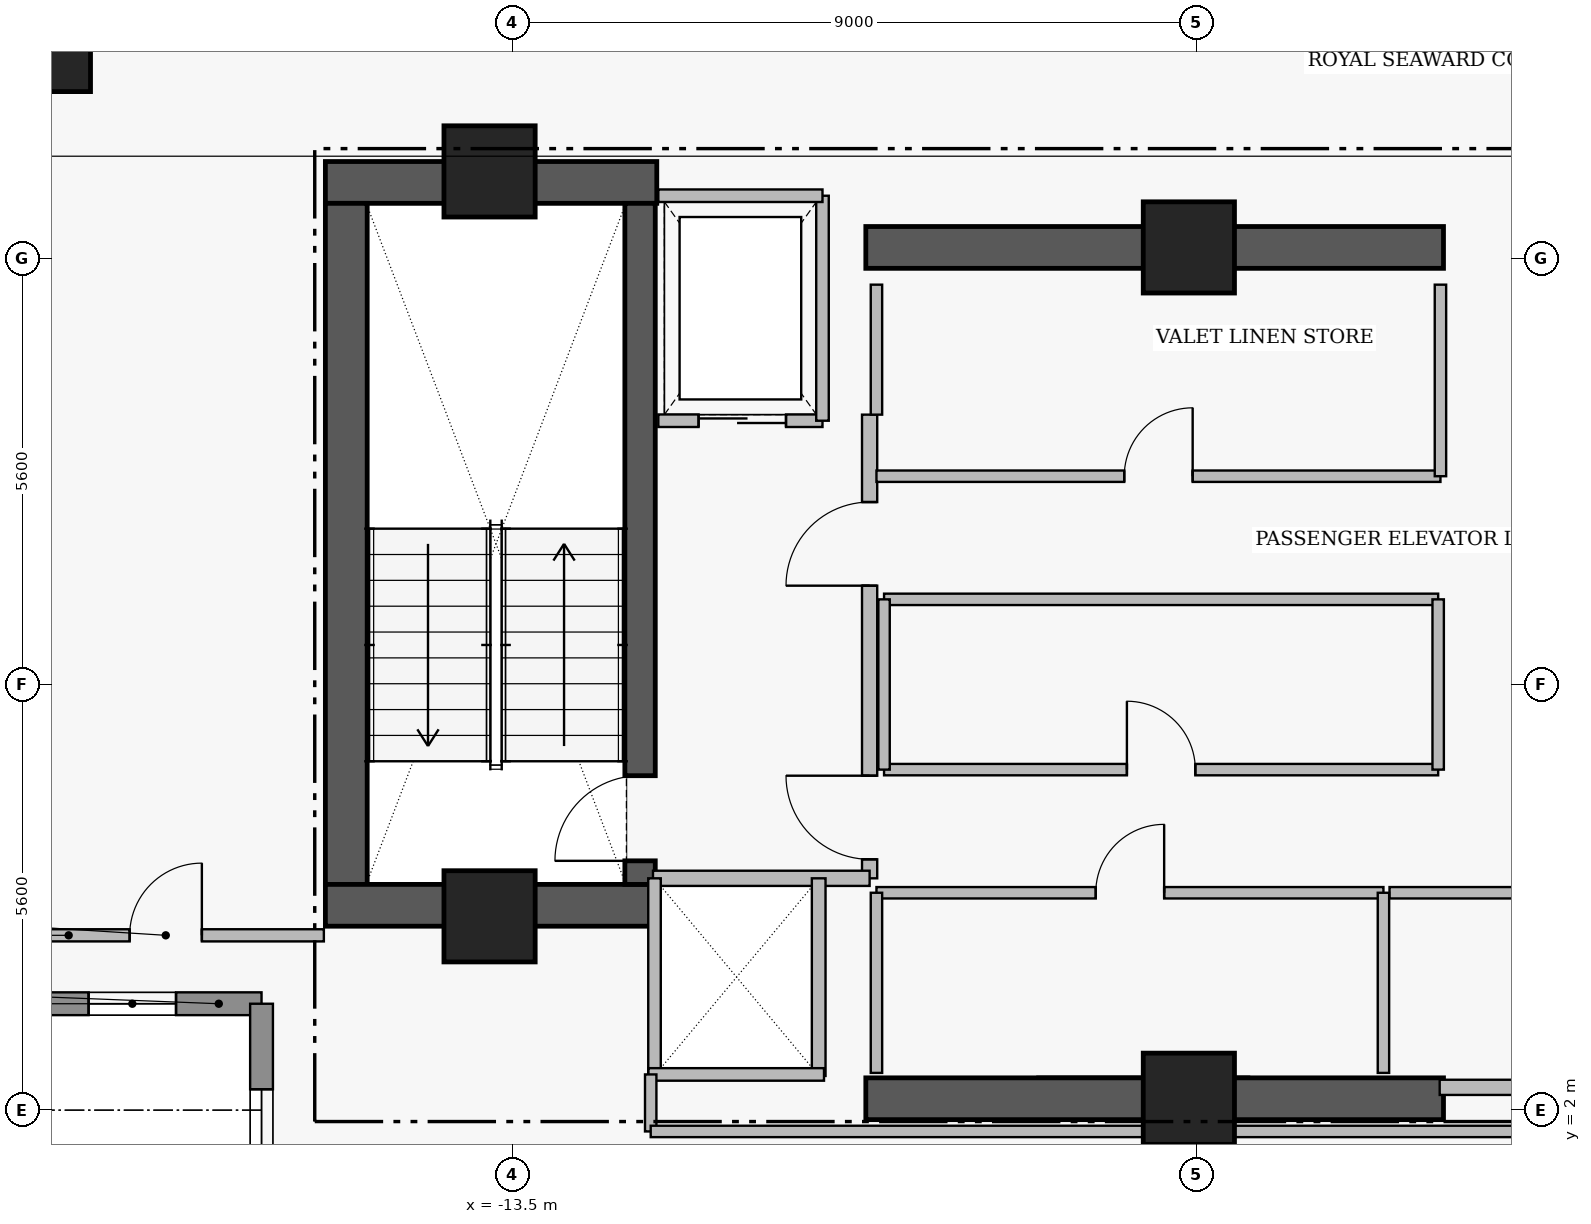
"""IFC4 building model, lengths in metres.
Left out: names, types, materials, properties, quantities, classifications, styles, units other than length and angle.
Written with IfcOpenShell. Run it as: python <this file> out.ifc"""

import sys

from ifc_helpers import new_model, si_unit, direction, frame, frame_2d, origin, origin_2d, place, context, subcontext, project, spatial, rectangle, extrude, element, fill, save


model = new_model("IFC4")
c1 = context("Model", 3, precision=1e-05, world=origin(), true_north=direction((0.0, 1.0)))
c2 = subcontext(c1, "Body", "Model", "MODEL_VIEW")
j1 = project(units=[si_unit("LENGTHUNIT", "METRE"), si_unit("PLANEANGLEUNIT", "RADIAN")], contexts=[c1])
p1 = place(None, origin())
s1 = spatial("IfcSite", under=j1, at=p1, CompositionType="ELEMENT")
p2 = place(p1, origin())
s2 = spatial("IfcBuilding", under=s1, at=p2, CompositionType="ELEMENT")
p3 = place(p2, frame((0.0, 0.0, 261.85)))
s3 = spatial("IfcBuildingStorey", under=s2, at=p3, CompositionType="ELEMENT", Elevation=261.85)
p4 = place(p3, frame((-15.96, 14.205, 0.0), z_axis=(0.0, 0.0, 1.0), x_axis=(1.0, 0.0, 0.0)))
e1 = element("IfcWall", 1, at=p4, inside=s3, PredefinedType="SHEAR", context=c2, shape_type="SweptSolid", body=[
    extrude(rectangle(XDim=4.36, YDim=0.55, at=frame_2d((2.18, 0.0))), origin(), (0.0, 0.0, 1.0), 3.51),
])
p5 = place(p3, frame((-15.685, 4.97, 0.0), z_axis=(0.0, 0.0, 1.0), x_axis=(0.0, 1.0, 0.0)))
e2 = element("IfcWall", 2, at=p5, inside=s3, PredefinedType="SHEAR", context=c2, shape_type="SweptSolid", body=[
    extrude(rectangle(XDim=8.96, YDim=0.55, at=frame_2d((4.48, 0.0))), origin(), (0.0, 0.0, 1.0), 3.51),
])
p6 = place(p3, frame((-15.96, 4.695, 0.0), z_axis=(0.0, 0.0, 1.0), x_axis=(1.0, 0.0, 0.0)))
e3 = element("IfcWall", 3, at=p6, inside=s3, PredefinedType="SHEAR", context=c2, shape_type="SweptSolid", body=[
    extrude(rectangle(XDim=4.36, YDim=0.55, at=frame_2d((2.18, 0.0))), origin(), (0.0, 0.0, 1.0), 3.51),
])
for number, where, z_axis, x_axis in (
    (4, (-8.85, 2.15, 0.0), (0.0, 0.0, 1.0), (1.0, 0.0, 0.0)),
    (5, (-8.85, 13.35, 0.0), (0.0, 0.0, 1.0), (1.0, 0.0, 0.0)),
):
    element("IfcWall", number, at=place(p3, frame(where, z_axis=z_axis, x_axis=x_axis)), inside=s3, PredefinedType="SHEAR", context=c2, shape_type="SweptSolid", body=[
        extrude(rectangle(XDim=7.6, YDim=0.55, at=frame_2d((3.8, 0.0))), origin(), (0.0, 0.0, 1.0), 3.48),
    ])
p7 = place(p3, frame((-11.82, 4.97, 0.0), z_axis=(0.0, 0.0, 1.0), x_axis=(0.0, 1.0, 0.0)))
e6 = element("IfcWall", 6, at=p7, inside=s3, PredefinedType="SHEAR", context=c2, shape_type="SweptSolid", body=[
    extrude(rectangle(XDim=8.96, YDim=0.4, at=frame_2d((4.48, 0.0))), origin(), (0.0, 0.0, 1.0), 3.51),
])
p8 = place(p7, frame((0.31, 0.0, 0.0)))
e7 = element("IfcOpeningElement", 7, at=p8, cuts=e6, PredefinedType="OPENING", context=c2, shape_type="SweptSolid", body=[
    extrude(rectangle(XDim=1.12, YDim=2.22, at=frame_2d((0.56, 1.11))), frame((0.0, 0.21, 0.0), z_axis=(0.0, -1.0, 0.0), x_axis=(1.0, 0.0, 0.0)), (0.0, 0.0, 1.0), 0.42),
])
for number, where, z_axis, x_axis in (
    (8, (-13.8, 14.35, 0.0), (0.0, 0.0, 1.0), (1.0, 0.0, 0.0)),
    (9, (-4.6, 13.35, 0.0), (0.0, 0.0, 1.0), (1.0, 0.0, 0.0)),
    (10, (-13.8, 4.55, 0.0), (0.0, 0.0, 1.0), (1.0, 0.0, 0.0)),
    (11, (-4.6, 2.15, 0.0), (0.0, 0.0, 1.0), (1.0, 0.0, 0.0)),
):
    element("IfcColumn", number, at=place(p3, frame(where, z_axis=z_axis, x_axis=x_axis)), inside=s3, PredefinedType="COLUMN", context=c2, shape_type="SweptSolid", body=[
        extrude(rectangle(XDim=1.2, YDim=1.2, at=origin_2d()), origin(), (0.0, 0.0, 1.0), 3.7),
    ])
p9 = place(p3, frame((-19.55, 15.9, 0.0), z_axis=(0.0, 0.0, 1.0), x_axis=(1.0, 0.0, 0.0)))
e12 = element("IfcColumn", 12, at=p9, inside=s3, PredefinedType="COLUMN", context=c2, shape_type="SweptSolid", body=[
    extrude(rectangle(XDim=1.0, YDim=1.0, at=origin_2d()), origin(), (0.0, 0.0, 1.0), 3.7),
])
p10 = place(p3, frame((-16.8, 3.4, 0.0), z_axis=(0.0, 0.0, 1.0), x_axis=(-1.0, 0.0, 0.0)))
e13 = element("IfcWall", 13, at=p10, inside=s3, PredefinedType="STANDARD", context=c2, shape_type="SweptSolid", body=[
    extrude(rectangle(XDim=3.4, YDim=0.3, at=frame_2d((1.7, 0.0))), origin(), (0.0, 0.0, 1.0), 3.48),
])
p11 = place(p10, frame((1.125, 0.0, 1.25)))
e14 = element("IfcOpeningElement", 14, at=p11, cuts=e13, PredefinedType="OPENING", context=c2, shape_type="SweptSolid", body=[
    extrude(rectangle(XDim=1.15, YDim=1.55, at=frame_2d((0.575, 0.775))), frame((0.0, 0.16, 0.0), z_axis=(0.0, -1.0, 0.0), x_axis=(1.0, 0.0, 0.0)), (0.0, 0.0, 1.0), 0.32),
])
p12 = place(p3, frame((-16.8, 0.0, 0.0), z_axis=(0.0, 0.0, 1.0), x_axis=(0.0, 1.0, 0.0)))
e15 = element("IfcWall", 15, at=p12, inside=s3, PredefinedType="STANDARD", context=c2, shape_type="SweptSolid", body=[
    extrude(rectangle(XDim=3.4, YDim=0.3, at=frame_2d((1.7, 0.0))), origin(), (0.0, 0.0, 1.0), 3.48),
])
p13 = place(p12, frame((1.125, 0.0, 1.25)))
e16 = element("IfcOpeningElement", 16, at=p13, cuts=e15, PredefinedType="OPENING", context=c2, shape_type="SweptSolid", body=[
    extrude(rectangle(XDim=1.15, YDim=1.55, at=frame_2d((0.575, 0.775))), frame((0.0, 0.16, 0.0), z_axis=(0.0, -1.0, 0.0), x_axis=(1.0, 0.0, 0.0)), (0.0, 0.0, 1.0), 0.32),
])
p14 = place(p3, frame((-8.8, 5.05, 0.0), z_axis=(0.0, 0.0, 1.0), x_axis=(0.0, 1.0, 0.0)))
e17 = element("IfcWall", 17, at=p14, inside=s3, PredefinedType="PARTITIONING", context=c2, shape_type="SweptSolid", body=[
    extrude(rectangle(XDim=6.1, YDim=0.2, at=frame_2d((3.05, 0.0))), origin(), (0.0, 0.0, 1.0), 3.48),
])
p15 = place(p14, frame((0.25, 0.0, 0.0)))
e18 = element("IfcOpeningElement", 18, at=p15, cuts=e17, PredefinedType="OPENING", context=c2, shape_type="SweptSolid", body=[
    extrude(rectangle(XDim=1.1, YDim=2.2, at=frame_2d((0.55, 1.1))), frame((0.0, 0.11, 0.0), z_axis=(0.0, -1.0, 0.0), x_axis=(1.0, 0.0, 0.0)), (0.0, 0.0, 1.0), 0.22),
])
p16 = place(p14, frame((3.85, 0.0, 0.0)))
e19 = element("IfcOpeningElement", 19, at=p16, cuts=e17, PredefinedType="OPENING", context=c2, shape_type="SweptSolid", body=[
    extrude(rectangle(XDim=1.1, YDim=2.2, at=frame_2d((0.55, 1.1))), frame((0.0, 0.11, 0.0), z_axis=(0.0, -1.0, 0.0), x_axis=(1.0, 0.0, 0.0)), (0.0, 0.0, 1.0), 0.22),
])
p17 = place(p3, frame((-11.58, 11.07, 0.0), z_axis=(0.0, 0.0, 1.0), x_axis=(1.0, 0.0, 0.0)))
e20 = element("IfcWall", 20, at=p17, inside=s3, PredefinedType="PARTITIONING", context=c2, shape_type="SweptSolid", body=[
    extrude(rectangle(XDim=2.16, YDim=0.165, at=frame_2d((1.08, 0.0))), origin(), (0.0, 0.0, 1.0), 3.48),
])
p18 = place(p17, frame((0.53, 0.0, 0.0)))
e21 = element("IfcOpeningElement", 21, at=p18, cuts=e20, PredefinedType="OPENING", context=c2, shape_type="SweptSolid", body=[
    extrude(rectangle(XDim=1.15, YDim=2.25, at=frame_2d((0.575, 1.125))), frame((0.0, 0.093, 0.0), z_axis=(0.0, -1.0, 0.0), x_axis=(1.0, 0.0, 0.0)), (0.0, 0.0, 1.0), 0.185),
])
p19 = place(p3, frame((-8.71, 4.86, 0.0), z_axis=(0.0, 0.0, 1.0), x_axis=(1.0, 0.0, 0.0)))
e22 = element("IfcWall", 22, at=p19, inside=s3, PredefinedType="PARTITIONING", context=c2, shape_type="SweptSolid", body=[
    extrude(rectangle(XDim=6.67, YDim=0.15, at=frame_2d((3.335, 0.0))), origin(), (0.0, 0.0, 1.0), 3.48),
])
p20 = place(p19, frame((2.885, 0.0, 0.0)))
e23 = element("IfcOpeningElement", 23, at=p20, cuts=e22, PredefinedType="OPENING", context=c2, shape_type="SweptSolid", body=[
    extrude(rectangle(XDim=0.9, YDim=2.15, at=frame_2d((0.45, 1.075))), frame((0.0, 0.085, 0.0), z_axis=(0.0, -1.0, 0.0), x_axis=(1.0, 0.0, 0.0)), (0.0, 0.0, 1.0), 0.17),
])
p21 = place(p3, frame((-1.96, 4.86, 0.0), z_axis=(0.0, 0.0, 1.0), x_axis=(1.0, 0.0, 0.0)))
e24 = element("IfcWall", 24, at=p21, inside=s3, PredefinedType="PARTITIONING", context=c2, shape_type="SweptSolid", body=[
    extrude(rectangle(XDim=5.67, YDim=0.15, at=frame_2d((2.835, 0.0))), origin(), (0.0, 0.0, 1.0), 3.48),
])
p22 = place(p21, frame((2.385, 0.0, 0.0)))
e25 = element("IfcOpeningElement", 25, at=p22, cuts=e24, PredefinedType="OPENING", context=c2, shape_type="SweptSolid", body=[
    extrude(rectangle(XDim=0.9, YDim=2.15, at=frame_2d((0.45, 1.075))), frame((0.0, 0.085, 0.0), z_axis=(0.0, -1.0, 0.0), x_axis=(1.0, 0.0, 0.0)), (0.0, 0.0, 1.0), 0.17),
])
p23 = place(p3, frame((-8.71, 10.34, 0.0), z_axis=(0.0, 0.0, 1.0), x_axis=(1.0, 0.0, 0.0)))
e26 = element("IfcWall", 26, at=p23, inside=s3, PredefinedType="PARTITIONING", context=c2, shape_type="SweptSolid", body=[
    extrude(rectangle(XDim=7.42, YDim=0.15, at=frame_2d((3.71, 0.0))), origin(), (0.0, 0.0, 1.0), 3.48),
])
p24 = place(p23, frame((3.26, 0.0, 0.0)))
e27 = element("IfcOpeningElement", 27, at=p24, cuts=e26, PredefinedType="OPENING", context=c2, shape_type="SweptSolid", body=[
    extrude(rectangle(XDim=0.9, YDim=2.15, at=frame_2d((0.45, 1.075))), frame((0.0, 0.085, 0.0), z_axis=(0.0, -1.0, 0.0), x_axis=(1.0, 0.0, 0.0)), (0.0, 0.0, 1.0), 0.17),
])
p25 = place(p3, frame((-8.61, 6.48, 0.0), z_axis=(0.0, 0.0, 1.0), x_axis=(1.0, 0.0, 0.0)))
e28 = element("IfcWall", 28, at=p25, inside=s3, PredefinedType="PARTITIONING", context=c2, shape_type="SweptSolid", body=[
    extrude(rectangle(XDim=7.29, YDim=0.15, at=frame_2d((3.645, 0.0))), origin(), (0.0, 0.0, 1.0), 3.48),
])
p26 = place(p25, frame((3.195, 0.0, 0.0)))
e29 = element("IfcOpeningElement", 29, at=p26, cuts=e28, PredefinedType="OPENING", context=c2, shape_type="SweptSolid", body=[
    extrude(rectangle(XDim=0.9, YDim=2.15, at=frame_2d((0.45, 1.075))), frame((0.0, 0.085, 0.0), z_axis=(0.0, -1.0, 0.0), x_axis=(1.0, 0.0, 0.0)), (0.0, 0.0, 1.0), 0.17),
])
p27 = place(p3, frame((-20.14, 4.3, 0.0), z_axis=(0.0, 0.0, 1.0), x_axis=(1.0, 0.0, 0.0)))
e30 = element("IfcWall", 30, at=p27, inside=s3, PredefinedType="PARTITIONING", context=c2, shape_type="SweptSolid", body=[
    extrude(rectangle(XDim=4.16, YDim=0.16, at=frame_2d((2.08, 0.0))), origin(), (0.0, 0.0, 1.0), 3.48),
])
p28 = place(p27, frame((1.605, 0.0, 0.0)))
e31 = element("IfcOpeningElement", 31, at=p28, cuts=e30, PredefinedType="OPENING", context=c2, shape_type="SweptSolid", body=[
    extrude(rectangle(XDim=0.95, YDim=2.15, at=frame_2d((0.475, 1.075))), frame((0.0, 0.09, 0.0), z_axis=(0.0, -1.0, 0.0), x_axis=(1.0, 0.0, 0.0)), (0.0, 0.0, 1.0), 0.18),
])
p29 = place(p3, frame((-11.65, 5.05, 0.0), z_axis=(0.0, 0.0, 1.0), x_axis=(1.0, 0.0, 0.0)))
e32 = element("IfcWall", 32, at=p29, inside=s3, PredefinedType="PARTITIONING", context=c2, shape_type="SweptSolid", body=[
    extrude(rectangle(XDim=2.85, YDim=0.2, at=frame_2d((1.425, 0.0))), origin(), (0.0, 0.0, 1.0), 3.48),
])
p30 = place(p3, frame((-9.42, 11.07, 0.0), z_axis=(0.0, 0.0, 1.0), x_axis=(0.0, 1.0, 0.0)))
e33 = element("IfcWall", 33, at=p30, inside=s3, PredefinedType="PARTITIONING", context=c2, shape_type="SweptSolid", body=[
    extrude(rectangle(XDim=2.96, YDim=0.165, at=frame_2d((1.48, 0.0))), origin(), (0.0, 0.0, 1.0), 3.48),
])
p31 = place(p3, frame((-11.58, 14.03, 0.0), z_axis=(0.0, 0.0, 1.0), x_axis=(1.0, 0.0, 0.0)))
e34 = element("IfcWall", 34, at=p31, inside=s3, PredefinedType="PARTITIONING", context=c2, shape_type="SweptSolid", body=[
    extrude(rectangle(XDim=2.16, YDim=0.165, at=frame_2d((1.08, 0.0))), origin(), (0.0, 0.0, 1.0), 3.48),
])
p32 = place(p3, frame((-1.3, 2.3, 0.0), z_axis=(0.0, 0.0, 1.0), x_axis=(1.0, 0.0, 0.0)))
e35 = element("IfcWall", 35, at=p32, inside=s3, PredefinedType="PARTITIONING", context=c2, shape_type="SweptSolid", body=[
    extrude(rectangle(XDim=2.6, YDim=0.2, at=frame_2d((1.3, 0.0))), origin(), (0.0, 0.0, 1.0), 2.38),
])
for number, where, z_axis, x_axis in (
    (36, (-8.71, 2.49, 0.0), (0.0, 0.0, 1.0), (0.0, 1.0, 0.0)),
    (37, (-2.04, 2.49, 0.0), (0.0, 0.0, 1.0), (0.0, 1.0, 0.0)),
):
    element("IfcWall", number, at=place(p3, frame(where, z_axis=z_axis, x_axis=x_axis)), inside=s3, PredefinedType="PARTITIONING", context=c2, shape_type="SweptSolid", body=[
        extrude(rectangle(XDim=2.37, YDim=0.15, at=frame_2d((1.185, 0.0))), origin(), (0.0, 0.0, 1.0), 3.48),
    ])
p33 = place(p3, frame((-8.71, 11.15, 0.0), z_axis=(0.0, 0.0, 1.0), x_axis=(0.0, 1.0, 0.0)))
e38 = element("IfcWall", 38, at=p33, inside=s3, PredefinedType="PARTITIONING", context=c2, shape_type="SweptSolid", body=[
    extrude(rectangle(XDim=1.71, YDim=0.15, at=frame_2d((0.855, 0.0))), origin(), (0.0, 0.0, 1.0), 3.48),
])
p34 = place(p3, frame((-1.29, 10.34, 0.0), z_axis=(0.0, 0.0, 1.0), x_axis=(0.0, 1.0, 0.0)))
e39 = element("IfcWall", 39, at=p34, inside=s3, PredefinedType="PARTITIONING", context=c2, shape_type="SweptSolid", body=[
    extrude(rectangle(XDim=2.52, YDim=0.15, at=frame_2d((1.26, 0.0))), origin(), (0.0, 0.0, 1.0), 3.48),
])
p35 = place(p3, frame((-9.47, 2.45, 0.0), z_axis=(0.0, 0.0, 1.0), x_axis=(0.0, 1.0, 0.0)))
e40 = element("IfcWall", 40, at=p35, inside=s3, PredefinedType="PARTITIONING", context=c2, shape_type="SweptSolid", body=[
    extrude(rectangle(XDim=2.6, YDim=0.18, at=frame_2d((1.3, 0.0))), origin(), (0.0, 0.0, 1.0), 3.48),
])
p36 = place(p3, frame((-11.63, 2.47, 0.0), z_axis=(0.0, 0.0, 1.0), x_axis=(0.0, 1.0, 0.0)))
e41 = element("IfcWall", 41, at=p36, inside=s3, PredefinedType="PARTITIONING", context=c2, shape_type="SweptSolid", body=[
    extrude(rectangle(XDim=2.58, YDim=0.165, at=frame_2d((1.29, 0.0))), origin(), (0.0, 0.0, 1.0), 3.48),
])
p37 = place(p3, frame((-11.71, 2.47, 0.0), z_axis=(0.0, 0.0, 1.0), x_axis=(1.0, 0.0, 0.0)))
e42 = element("IfcWall", 42, at=p37, inside=s3, PredefinedType="PARTITIONING", context=c2, shape_type="SweptSolid", body=[
    extrude(rectangle(XDim=2.31, YDim=0.165, at=frame_2d((1.155, 0.0))), origin(), (0.0, 0.0, 1.0), 2.38),
])
p38 = place(p3, frame((-8.61, 8.72, 0.0), z_axis=(0.0, 0.0, 1.0), x_axis=(1.0, 0.0, 0.0)))
e43 = element("IfcWall", 43, at=p38, inside=s3, PredefinedType="PARTITIONING", context=c2, shape_type="SweptSolid", body=[
    extrude(rectangle(XDim=7.29, YDim=0.15, at=frame_2d((3.645, 0.0))), origin(), (0.0, 0.0, 1.0), 3.48),
])
for number, where, z_axis, x_axis in (
    (44, (-8.61, 6.48, 0.0), (0.0, 0.0, 1.0), (0.0, 1.0, 0.0)),
    (45, (-1.32, 6.48, 0.0), (0.0, 0.0, 1.0), (0.0, 1.0, 0.0)),
):
    element("IfcWall", number, at=place(p3, frame(where, z_axis=z_axis, x_axis=x_axis)), inside=s3, PredefinedType="PARTITIONING", context=c2, shape_type="SweptSolid", body=[
        extrude(rectangle(XDim=2.24, YDim=0.15, at=frame_2d((1.12, 0.0))), origin(), (0.0, 0.0, 1.0), 3.48),
    ])
p39 = place(p3, frame((-11.68, 1.72, 0.0), z_axis=(0.0, 0.0, 1.0), x_axis=(0.0, 1.0, 0.0)))
e46 = element("IfcWall", 46, at=p39, inside=s3, PredefinedType="PARTITIONING", context=c2, shape_type="SweptSolid", body=[
    extrude(rectangle(XDim=0.75, YDim=0.15, at=frame_2d((0.375, 0.0))), origin(), (0.0, 0.0, 1.0), 3.48),
])
p40 = place(p3, frame((-11.68, 1.72, 0.0), z_axis=(0.0, 0.0, 1.0), x_axis=(1.0, 0.0, 0.0)))
e47 = element("IfcWall", 47, at=p40, inside=s3, PredefinedType="PARTITIONING", context=c2, shape_type="SweptSolid", body=[
    extrude(rectangle(XDim=11.68, YDim=0.15, at=frame_2d((5.84, 0.0))), origin(), (0.0, 0.0, 1.0), 2.38),
])
p41 = place(p11, origin())
e48 = element("IfcWindow", 48, at=p41, inside=s3, PartitioningType="SINGLE_PANEL", PredefinedType="WINDOW", context=c2, shape_type="SweptSolid", body=[
    extrude(rectangle(XDim=1.15, YDim=1.55, at=frame_2d((0.575, 0.775))), frame((0.0, 0.03, 0.0), z_axis=(0.0, -1.0, 0.0), x_axis=(1.0, 0.0, 0.0)), (0.0, 0.0, 1.0), 0.06),
])
fill(e14, e48)
p42 = place(p13, origin())
e49 = element("IfcWindow", 49, at=p42, inside=s3, PartitioningType="SINGLE_PANEL", PredefinedType="WINDOW", context=c2, shape_type="SweptSolid", body=[
    extrude(rectangle(XDim=1.15, YDim=1.55, at=frame_2d((0.575, 0.775))), frame((0.0, 0.03, 0.0), z_axis=(0.0, -1.0, 0.0), x_axis=(1.0, 0.0, 0.0)), (0.0, 0.0, 1.0), 0.06),
])
fill(e16, e49)
p43 = place(p8, origin())
e50 = element("IfcDoor", 50, at=p43, inside=s3, OperationType="SINGLE_SWING_LEFT", PredefinedType="DOOR", context=c2, shape_type="SweptSolid", body=[
    extrude(rectangle(XDim=1.12, YDim=2.22, at=frame_2d((0.56, 1.11))), frame((0.0, 0.025, 0.0), z_axis=(0.0, -1.0, 0.0), x_axis=(1.0, 0.0, 0.0)), (0.0, 0.0, 1.0), 0.05),
])
fill(e7, e50)
p44 = place(p15, origin())
e51 = element("IfcDoor", 51, at=p44, inside=s3, OperationType="SINGLE_SWING_RIGHT", PredefinedType="DOOR", context=c2, shape_type="SweptSolid", body=[
    extrude(rectangle(XDim=1.1, YDim=2.2, at=frame_2d((0.55, 1.1))), frame((0.0, 0.025, 0.0), z_axis=(0.0, -1.0, 0.0), x_axis=(1.0, 0.0, 0.0)), (0.0, 0.0, 1.0), 0.05),
])
fill(e18, e51)
p45 = place(p16, origin())
e52 = element("IfcDoor", 52, at=p45, inside=s3, OperationType="SINGLE_SWING_LEFT", PredefinedType="DOOR", context=c2, shape_type="SweptSolid", body=[
    extrude(rectangle(XDim=1.1, YDim=2.2, at=frame_2d((0.55, 1.1))), frame((0.0, 0.025, 0.0), z_axis=(0.0, -1.0, 0.0), x_axis=(1.0, 0.0, 0.0)), (0.0, 0.0, 1.0), 0.05),
])
fill(e19, e52)
p46 = place(p18, origin())
e53 = element("IfcDoor", 53, at=p46, inside=s3, OperationType="SLIDING_TO_LEFT", PredefinedType="DOOR", context=c2, shape_type="SweptSolid", body=[
    extrude(rectangle(XDim=1.15, YDim=2.25, at=frame_2d((0.575, 1.125))), frame((0.0, 0.025, 0.0), z_axis=(0.0, -1.0, 0.0), x_axis=(1.0, 0.0, 0.0)), (0.0, 0.0, 1.0), 0.05),
])
fill(e21, e53)
p47 = place(p20, origin())
e54 = element("IfcDoor", 54, at=p47, inside=s3, OperationType="SINGLE_SWING_RIGHT", PredefinedType="DOOR", context=c2, shape_type="SweptSolid", body=[
    extrude(rectangle(XDim=0.9, YDim=2.15, at=frame_2d((0.45, 1.075))), frame((0.0, 0.025, 0.0), z_axis=(0.0, -1.0, 0.0), x_axis=(1.0, 0.0, 0.0)), (0.0, 0.0, 1.0), 0.05),
])
fill(e23, e54)
p48 = place(p24, origin())
e55 = element("IfcDoor", 55, at=p48, inside=s3, OperationType="SINGLE_SWING_RIGHT", PredefinedType="DOOR", context=c2, shape_type="SweptSolid", body=[
    extrude(rectangle(XDim=0.9, YDim=2.15, at=frame_2d((0.45, 1.075))), frame((0.0, 0.025, 0.0), z_axis=(0.0, -1.0, 0.0), x_axis=(1.0, 0.0, 0.0)), (0.0, 0.0, 1.0), 0.05),
])
fill(e27, e55)
p49 = place(p26, origin())
e56 = element("IfcDoor", 56, at=p49, inside=s3, OperationType="SINGLE_SWING_LEFT", PredefinedType="DOOR", context=c2, shape_type="SweptSolid", body=[
    extrude(rectangle(XDim=0.9, YDim=2.15, at=frame_2d((0.45, 1.075))), frame((0.0, 0.025, 0.0), z_axis=(0.0, -1.0, 0.0), x_axis=(1.0, 0.0, 0.0)), (0.0, 0.0, 1.0), 0.05),
])
fill(e29, e56)
p50 = place(p28, origin())
e57 = element("IfcDoor", 57, at=p50, inside=s3, OperationType="SINGLE_SWING_RIGHT", PredefinedType="DOOR", context=c2, shape_type="SweptSolid", body=[
    extrude(rectangle(XDim=0.95, YDim=2.15, at=frame_2d((0.475, 1.075))), frame((0.0, 0.025, 0.0), z_axis=(0.0, -1.0, 0.0), x_axis=(1.0, 0.0, 0.0)), (0.0, 0.0, 1.0), 0.05),
])
fill(e31, e57)
save(model, sys.argv[1])
